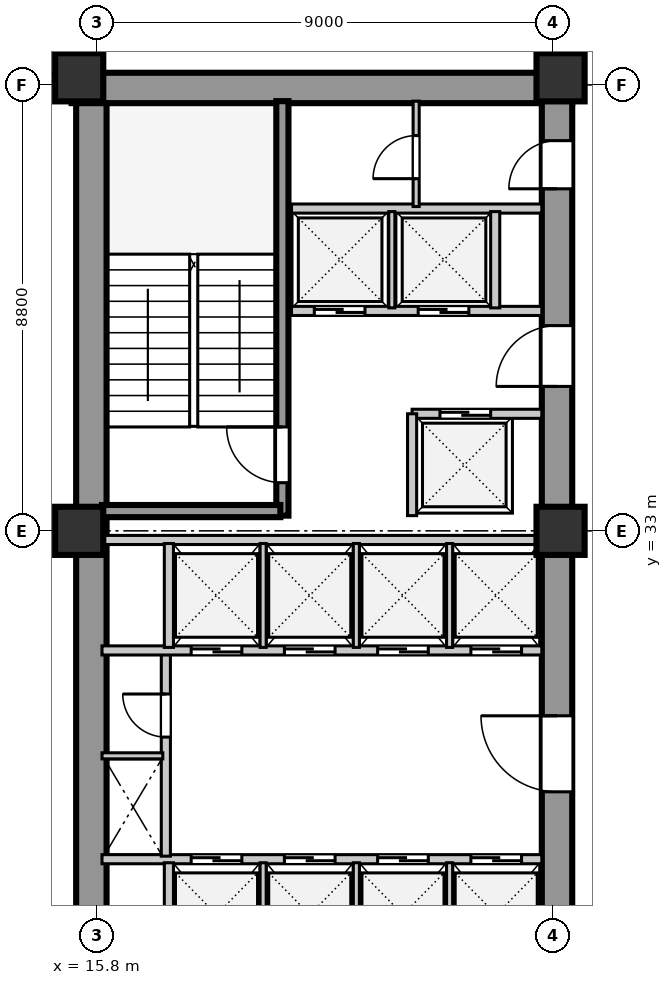
"""IFC4 building model, lengths in metres.
Left out: names, types, materials, properties, quantities, classifications, styles, units other than length and angle.
Written with IfcOpenShell. Run it as: python <this file> out.ifc"""

import sys

from ifc_helpers import new_model, si_unit, direction, frame, frame_2d, origin, origin_2d, place, context, subcontext, project, spatial, rectangle, extrude, element, fill, save


model = new_model("IFC4")
c1 = context("Model", 3, precision=1e-05, world=origin(), true_north=direction((0.0, 1.0)))
c2 = subcontext(c1, "Body", "Model", "MODEL_VIEW")
j1 = project(units=[si_unit("LENGTHUNIT", "METRE"), si_unit("PLANEANGLEUNIT", "RADIAN")], contexts=[c1])
p1 = place(None, origin())
s1 = spatial("IfcSite", under=j1, at=p1, CompositionType="ELEMENT")
p2 = place(p1, origin())
s2 = spatial("IfcBuilding", under=s1, at=p2, CompositionType="ELEMENT")
p3 = place(p2, frame((0.0, 0.0, 8.0)))
s3 = spatial("IfcBuildingStorey", under=s2, at=p3, CompositionType="ELEMENT", Elevation=8.0)
p4 = place(p3, frame((15.3, 41.74, 0.0), z_axis=(0.0, 0.0, 1.0), x_axis=(1.0, 0.0, 0.0)))
e1 = element("IfcWall", 1, at=p4, inside=s3, PredefinedType="SHEAR", context=c2, shape_type="SweptSolid", body=[
    extrude(rectangle(XDim=9.88, YDim=0.6, at=frame_2d((4.94, 0.0))), origin(), (0.0, 0.0, 1.0), 4.22),
])
p5 = place(p3, frame((15.69, 15.81, 0.0), z_axis=(0.0, 0.0, 1.0), x_axis=(0.0, 1.0, 0.0)))
e2 = element("IfcWall", 2, at=p5, inside=s3, PredefinedType="SHEAR", context=c2, shape_type="SweptSolid", body=[
    extrude(rectangle(XDim=25.63, YDim=0.6, at=frame_2d((12.815, 0.0))), origin(), (0.0, 0.0, 1.0), 4.22),
])
p6 = place(p3, frame((24.88, 15.74, 0.0), z_axis=(0.0, 0.0, 1.0), x_axis=(0.0, 1.0, 0.0)))
e3 = element("IfcWall", 3, at=p6, inside=s3, PredefinedType="SHEAR", context=c2, shape_type="SweptSolid", body=[
    extrude(rectangle(XDim=25.76, YDim=0.6, at=frame_2d((12.88, 0.0))), origin(), (0.0, 0.0, 1.0), 4.22),
])
p7 = place(p6, frame((1.61, 0.0, 0.0)))
e4 = element("IfcOpeningElement", 4, at=p7, cuts=e3, PredefinedType="OPENING", context=c2, shape_type="SweptSolid", body=[
    extrude(rectangle(XDim=1.2, YDim=2.1, at=frame_2d((0.6, 1.05))), frame((0.0, 0.31, 0.0), z_axis=(0.0, -1.0, 0.0), x_axis=(1.0, 0.0, 0.0)), (0.0, 0.0, 1.0), 0.62),
])
p8 = place(p6, frame((6.78, 0.0, 0.0)))
e5 = element("IfcOpeningElement", 5, at=p8, cuts=e3, PredefinedType="OPENING", context=c2, shape_type="SweptSolid", body=[
    extrude(rectangle(XDim=0.85, YDim=2.06, at=frame_2d((0.425, 1.03))), frame((0.0, 0.31, 0.0), z_axis=(0.0, -1.0, 0.0), x_axis=(1.0, 0.0, 0.0)), (0.0, 0.0, 1.0), 0.62),
])
p9 = place(p6, frame((12.11, 0.0, 0.0)))
e6 = element("IfcOpeningElement", 6, at=p9, cuts=e3, PredefinedType="OPENING", context=c2, shape_type="SweptSolid", body=[
    extrude(rectangle(XDim=1.5, YDim=2.12, at=frame_2d((0.75, 1.06))), frame((0.0, 0.31, 0.0), z_axis=(0.0, -1.0, 0.0), x_axis=(1.0, 0.0, 0.0)), (0.0, 0.0, 1.0), 0.62),
])
p10 = place(p6, frame((20.11, 0.0, 0.0)))
e7 = element("IfcOpeningElement", 7, at=p10, cuts=e3, PredefinedType="OPENING", context=c2, shape_type="SweptSolid", body=[
    extrude(rectangle(XDim=1.2, YDim=2.12, at=frame_2d((0.6, 1.06))), frame((0.0, 0.31, 0.0), z_axis=(0.0, -1.0, 0.0), x_axis=(1.0, 0.0, 0.0)), (0.0, 0.0, 1.0), 0.62),
])
p11 = place(p6, frame((24.01, 0.0, 0.0)))
e8 = element("IfcOpeningElement", 8, at=p11, cuts=e3, PredefinedType="OPENING", context=c2, shape_type="SweptSolid", body=[
    extrude(rectangle(XDim=0.95, YDim=2.1, at=frame_2d((0.475, 1.05))), frame((0.0, 0.31, 0.0), z_axis=(0.0, -1.0, 0.0), x_axis=(1.0, 0.0, 0.0)), (0.0, 0.0, 1.0), 0.62),
])
for number, where, z_axis, x_axis in (
    (9, (15.45, 33.0, 0.0), (0.0, 0.0, 1.0), (1.0, 0.0, 0.0)),
    (10, (15.45, 41.95, 0.0), (0.0, 0.0, 1.0), (1.0, 0.0, 0.0)),
    (11, (24.95, 33.0, 0.0), (0.0, 0.0, 1.0), (1.0, 0.0, 0.0)),
    (12, (24.95, 41.95, 0.0), (0.0, 0.0, 1.0), (1.0, 0.0, 0.0)),
):
    element("IfcColumn", number, at=place(p3, frame(where, z_axis=z_axis, x_axis=x_axis)), inside=s3, PredefinedType="COLUMN", context=c2, shape_type="SweptSolid", body=[
        extrude(rectangle(XDim=0.95, YDim=0.95, at=origin_2d()), origin(), (0.0, 0.0, 1.0), 4.22),
    ])
p12 = place(p3, frame((15.9, 26.52, 0.0), z_axis=(0.0, 0.0, 1.0), x_axis=(1.0, 0.0, 0.0)))
e13 = element("IfcWall", 13, at=p12, inside=s3, PredefinedType="SOLIDWALL", context=c2, shape_type="SweptSolid", body=[
    extrude(rectangle(XDim=8.68, YDim=0.18, at=frame_2d((4.34, 0.0))), origin(), (0.0, 0.0, 1.0), 4.22),
])
p13 = place(p12, frame((1.76, 0.0, 0.0)))
e14 = element("IfcOpeningElement", 14, at=p13, cuts=e13, PredefinedType="OPENING", context=c2, shape_type="SweptSolid", body=[
    extrude(rectangle(XDim=1.0, YDim=2.1, at=frame_2d((0.5, 1.05))), frame((0.0, 0.1, 0.0), z_axis=(0.0, -1.0, 0.0), x_axis=(1.0, 0.0, 0.0)), (0.0, 0.0, 1.0), 0.2),
])
p14 = place(p12, frame((3.6, 0.0, 0.0)))
e15 = element("IfcOpeningElement", 15, at=p14, cuts=e13, PredefinedType="OPENING", context=c2, shape_type="SweptSolid", body=[
    extrude(rectangle(XDim=1.0, YDim=2.1, at=frame_2d((0.5, 1.05))), frame((0.0, 0.1, 0.0), z_axis=(0.0, -1.0, 0.0), x_axis=(1.0, 0.0, 0.0)), (0.0, 0.0, 1.0), 0.2),
])
p15 = place(p12, frame((5.44, 0.0, 0.0)))
e16 = element("IfcOpeningElement", 16, at=p15, cuts=e13, PredefinedType="OPENING", context=c2, shape_type="SweptSolid", body=[
    extrude(rectangle(XDim=1.0, YDim=2.1, at=frame_2d((0.5, 1.05))), frame((0.0, 0.1, 0.0), z_axis=(0.0, -1.0, 0.0), x_axis=(1.0, 0.0, 0.0)), (0.0, 0.0, 1.0), 0.2),
])
p16 = place(p12, frame((7.28, 0.0, 0.0)))
e17 = element("IfcOpeningElement", 17, at=p16, cuts=e13, PredefinedType="OPENING", context=c2, shape_type="SweptSolid", body=[
    extrude(rectangle(XDim=1.0, YDim=2.1, at=frame_2d((0.5, 1.05))), frame((0.0, 0.1, 0.0), z_axis=(0.0, -1.0, 0.0), x_axis=(1.0, 0.0, 0.0)), (0.0, 0.0, 1.0), 0.2),
])
p17 = place(p3, frame((17.22, 24.4, 0.0), z_axis=(0.0, 0.0, 1.0), x_axis=(0.0, 1.0, 0.0)))
e18 = element("IfcWall", 18, at=p17, inside=s3, PredefinedType="SOLIDWALL", context=c2, shape_type="SweptSolid", body=[
    extrude(rectangle(XDim=2.05, YDim=0.18, at=frame_2d((1.025, 0.0))), origin(), (0.0, 0.0, 1.0), 4.22),
])
for number, where, z_axis, x_axis in (
    (19, (19.08, 24.4, 0.0), (0.0, 0.0, 1.0), (0.0, 1.0, 0.0)),
    (20, (20.92, 24.4, 0.0), (0.0, 0.0, 1.0), (0.0, 1.0, 0.0)),
    (21, (22.76, 24.4, 0.0), (0.0, 0.0, 1.0), (0.0, 1.0, 0.0)),
):
    element("IfcWall", number, at=place(p3, frame(where, z_axis=z_axis, x_axis=x_axis)), inside=s3, PredefinedType="PARTITIONING", context=c2, shape_type="SweptSolid", body=[
        extrude(rectangle(XDim=2.05, YDim=0.12, at=frame_2d((1.025, 0.0))), origin(), (0.0, 0.0, 1.0), 4.22),
    ])
p18 = place(p3, frame((17.16, 26.58, 0.0), z_axis=(0.0, 0.0, 1.0), x_axis=(0.0, 1.0, 0.0)))
e22 = element("IfcWall", 22, at=p18, inside=s3, PredefinedType="SOLIDWALL", context=c2, shape_type="SweptSolid", body=[
    extrude(rectangle(XDim=4.02, YDim=0.18, at=frame_2d((2.01, 0.0))), origin(), (0.0, 0.0, 1.0), 4.22),
])
p19 = place(p18, frame((2.35, 0.0, 0.0)))
e23 = element("IfcOpeningElement", 23, at=p19, cuts=e22, PredefinedType="OPENING", context=c2, shape_type="SweptSolid", body=[
    extrude(rectangle(XDim=0.85, YDim=2.06, at=frame_2d((0.425, 1.03))), frame((0.0, 0.1, 0.0), z_axis=(0.0, -1.0, 0.0), x_axis=(1.0, 0.0, 0.0)), (0.0, 0.0, 1.0), 0.2),
])
p20 = place(p3, frame((15.9, 28.56, 0.0), z_axis=(0.0, 0.0, 1.0), x_axis=(1.0, 0.0, 0.0)))
e24 = element("IfcWall", 24, at=p20, inside=s3, PredefinedType="PARTITIONING", context=c2, shape_type="SweptSolid", body=[
    extrude(rectangle(XDim=1.2, YDim=0.12, at=frame_2d((0.6, 0.0))), origin(), (0.0, 0.0, 1.0), 4.22),
])
p21 = place(p3, frame((15.9, 30.64, 0.0), z_axis=(0.0, 0.0, 1.0), x_axis=(1.0, 0.0, 0.0)))
e25 = element("IfcWall", 25, at=p21, inside=s3, PredefinedType="SOLIDWALL", context=c2, shape_type="SweptSolid", body=[
    extrude(rectangle(XDim=8.68, YDim=0.18, at=frame_2d((4.34, 0.0))), origin(), (0.0, 0.0, 1.0), 4.22),
])
p22 = place(p21, frame((1.76, 0.0, 0.0)))
e26 = element("IfcOpeningElement", 26, at=p22, cuts=e25, PredefinedType="OPENING", context=c2, shape_type="SweptSolid", body=[
    extrude(rectangle(XDim=1.0, YDim=2.1, at=frame_2d((0.5, 1.05))), frame((0.0, 0.1, 0.0), z_axis=(0.0, -1.0, 0.0), x_axis=(1.0, 0.0, 0.0)), (0.0, 0.0, 1.0), 0.2),
])
p23 = place(p21, frame((3.6, 0.0, 0.0)))
e27 = element("IfcOpeningElement", 27, at=p23, cuts=e25, PredefinedType="OPENING", context=c2, shape_type="SweptSolid", body=[
    extrude(rectangle(XDim=1.0, YDim=2.1, at=frame_2d((0.5, 1.05))), frame((0.0, 0.1, 0.0), z_axis=(0.0, -1.0, 0.0), x_axis=(1.0, 0.0, 0.0)), (0.0, 0.0, 1.0), 0.2),
])
p24 = place(p21, frame((5.44, 0.0, 0.0)))
e28 = element("IfcOpeningElement", 28, at=p24, cuts=e25, PredefinedType="OPENING", context=c2, shape_type="SweptSolid", body=[
    extrude(rectangle(XDim=1.0, YDim=2.1, at=frame_2d((0.5, 1.05))), frame((0.0, 0.1, 0.0), z_axis=(0.0, -1.0, 0.0), x_axis=(1.0, 0.0, 0.0)), (0.0, 0.0, 1.0), 0.2),
])
p25 = place(p21, frame((7.28, 0.0, 0.0)))
e29 = element("IfcOpeningElement", 29, at=p25, cuts=e25, PredefinedType="OPENING", context=c2, shape_type="SweptSolid", body=[
    extrude(rectangle(XDim=1.0, YDim=2.1, at=frame_2d((0.5, 1.05))), frame((0.0, 0.1, 0.0), z_axis=(0.0, -1.0, 0.0), x_axis=(1.0, 0.0, 0.0)), (0.0, 0.0, 1.0), 0.2),
])
p26 = place(p3, frame((15.9, 32.82, 0.0), z_axis=(0.0, 0.0, 1.0), x_axis=(1.0, 0.0, 0.0)))
e30 = element("IfcWall", 30, at=p26, inside=s3, PredefinedType="SOLIDWALL", context=c2, shape_type="SweptSolid", body=[
    extrude(rectangle(XDim=8.68, YDim=0.18, at=frame_2d((4.34, 0.0))), origin(), (0.0, 0.0, 1.0), 3.42),
])
p27 = place(p3, frame((17.22, 30.7, 0.0), z_axis=(0.0, 0.0, 1.0), x_axis=(0.0, 1.0, 0.0)))
e31 = element("IfcWall", 31, at=p27, inside=s3, PredefinedType="SOLIDWALL", context=c2, shape_type="SweptSolid", body=[
    extrude(rectangle(XDim=2.05, YDim=0.18, at=frame_2d((1.025, 0.0))), origin(), (0.0, 0.0, 1.0), 4.22),
])
for number, where, z_axis, x_axis in (
    (32, (19.08, 30.7, 0.0), (0.0, 0.0, 1.0), (0.0, 1.0, 0.0)),
    (33, (20.92, 30.7, 0.0), (0.0, 0.0, 1.0), (0.0, 1.0, 0.0)),
    (34, (22.76, 30.7, 0.0), (0.0, 0.0, 1.0), (0.0, 1.0, 0.0)),
):
    element("IfcWall", number, at=place(p3, frame(where, z_axis=z_axis, x_axis=x_axis)), inside=s3, PredefinedType="PARTITIONING", context=c2, shape_type="SweptSolid", body=[
        extrude(rectangle(XDim=2.05, YDim=0.12, at=frame_2d((1.025, 0.0))), origin(), (0.0, 0.0, 1.0), 4.22),
    ])
p28 = place(p3, frame((19.46, 33.3, 0.0), z_axis=(0.0, 0.0, 1.0), x_axis=(0.0, 1.0, 0.0)))
e35 = element("IfcWall", 35, at=p28, inside=s3, PredefinedType="SHEAR", context=c2, shape_type="SweptSolid", body=[
    extrude(rectangle(XDim=8.18, YDim=0.24, at=frame_2d((4.09, 0.0))), origin(), (0.0, 0.0, 1.0), 4.5),
])
p29 = place(p28, frame((0.65, 0.0, 0.0)))
e36 = element("IfcOpeningElement", 36, at=p29, cuts=e35, PredefinedType="OPENING", context=c2, shape_type="SweptSolid", body=[
    extrude(rectangle(XDim=1.1, YDim=2.1, at=frame_2d((0.55, 1.05))), frame((0.0, 0.13, 0.0), z_axis=(0.0, -1.0, 0.0), x_axis=(1.0, 0.0, 0.0)), (0.0, 0.0, 1.0), 0.26),
])
p30 = place(p3, frame((15.9, 33.39, 0.0), z_axis=(0.0, 0.0, 1.0), x_axis=(1.0, 0.0, 0.0)))
e37 = element("IfcWall", 37, at=p30, inside=s3, PredefinedType="SHEAR", context=c2, shape_type="SweptSolid", body=[
    extrude(rectangle(XDim=3.52, YDim=0.24, at=frame_2d((1.76, 0.0))), origin(), (0.0, 0.0, 1.0), 4.5),
])
p31 = place(p3, frame((22.02, 35.31, 0.0), z_axis=(0.0, 0.0, 1.0), x_axis=(1.0, 0.0, 0.0)))
e38 = element("IfcWall", 38, at=p31, inside=s3, PredefinedType="SOLIDWALL", context=c2, shape_type="SweptSolid", body=[
    extrude(rectangle(XDim=2.56, YDim=0.18, at=frame_2d((1.28, 0.0))), origin(), (0.0, 0.0, 1.0), 4.22),
])
p32 = place(p31, frame((0.55, 0.0, 0.0)))
e39 = element("IfcOpeningElement", 39, at=p32, cuts=e38, PredefinedType="OPENING", context=c2, shape_type="SweptSolid", body=[
    extrude(rectangle(XDim=1.0, YDim=2.1, at=frame_2d((0.5, 1.05))), frame((0.0, 0.1, 0.0), z_axis=(0.0, -1.0, 0.0), x_axis=(1.0, 0.0, 0.0)), (0.0, 0.0, 1.0), 0.2),
])
p33 = place(p3, frame((22.02, 33.3, 0.0), z_axis=(0.0, 0.0, 1.0), x_axis=(0.0, 1.0, 0.0)))
e40 = element("IfcWall", 40, at=p33, inside=s3, PredefinedType="SOLIDWALL", context=c2, shape_type="SweptSolid", body=[
    extrude(rectangle(XDim=2.01, YDim=0.18, at=frame_2d((1.005, 0.0))), origin(), (0.0, 0.0, 1.0), 4.22),
])
p34 = place(p3, frame((19.64, 37.34, 0.0), z_axis=(0.0, 0.0, 1.0), x_axis=(1.0, 0.0, 0.0)))
e41 = element("IfcWall", 41, at=p34, inside=s3, PredefinedType="SOLIDWALL", context=c2, shape_type="SweptSolid", body=[
    extrude(rectangle(XDim=4.94, YDim=0.18, at=frame_2d((2.47, 0.0))), origin(), (0.0, 0.0, 1.0), 4.22),
])
p35 = place(p34, frame((0.45, 0.0, 0.0)))
e42 = element("IfcOpeningElement", 42, at=p35, cuts=e41, PredefinedType="OPENING", context=c2, shape_type="SweptSolid", body=[
    extrude(rectangle(XDim=1.0, YDim=2.1, at=frame_2d((0.5, 1.05))), frame((0.0, 0.1, 0.0), z_axis=(0.0, -1.0, 0.0), x_axis=(1.0, 0.0, 0.0)), (0.0, 0.0, 1.0), 0.2),
])
p36 = place(p34, frame((2.5, 0.0, 0.0)))
e43 = element("IfcOpeningElement", 43, at=p36, cuts=e41, PredefinedType="OPENING", context=c2, shape_type="SweptSolid", body=[
    extrude(rectangle(XDim=1.0, YDim=2.1, at=frame_2d((0.5, 1.05))), frame((0.0, 0.1, 0.0), z_axis=(0.0, -1.0, 0.0), x_axis=(1.0, 0.0, 0.0)), (0.0, 0.0, 1.0), 0.2),
])
p37 = place(p3, frame((19.64, 39.36, 0.0), z_axis=(0.0, 0.0, 1.0), x_axis=(1.0, 0.0, 0.0)))
e44 = element("IfcWall", 44, at=p37, inside=s3, PredefinedType="SOLIDWALL", context=c2, shape_type="SweptSolid", body=[
    extrude(rectangle(XDim=4.94, YDim=0.18, at=frame_2d((2.47, 0.0))), origin(), (0.0, 0.0, 1.0), 4.22),
])
p38 = place(p3, frame((21.62, 37.4, 0.0), z_axis=(0.0, 0.0, 1.0), x_axis=(0.0, 1.0, 0.0)))
e45 = element("IfcWall", 45, at=p38, inside=s3, PredefinedType="PARTITIONING", context=c2, shape_type="SweptSolid", body=[
    extrude(rectangle(XDim=1.9, YDim=0.12, at=frame_2d((0.95, 0.0))), origin(), (0.0, 0.0, 1.0), 4.22),
])
p39 = place(p3, frame((23.66, 37.4, 0.0), z_axis=(0.0, 0.0, 1.0), x_axis=(0.0, 1.0, 0.0)))
e46 = element("IfcWall", 46, at=p39, inside=s3, PredefinedType="SOLIDWALL", context=c2, shape_type="SweptSolid", body=[
    extrude(rectangle(XDim=1.9, YDim=0.18, at=frame_2d((0.95, 0.0))), origin(), (0.0, 0.0, 1.0), 4.22),
])
p40 = place(p3, frame((22.1, 39.4, 0.0), z_axis=(0.0, 0.0, 1.0), x_axis=(0.0, 1.0, 0.0)))
e47 = element("IfcWall", 47, at=p40, inside=s3, PredefinedType="PARTITIONING", context=c2, shape_type="SweptSolid", body=[
    extrude(rectangle(XDim=2.08, YDim=0.12, at=frame_2d((1.04, 0.0))), origin(), (0.0, 0.0, 1.0), 4.22),
])
p41 = place(p40, frame((0.55, 0.0, 0.0)))
e48 = element("IfcOpeningElement", 48, at=p41, cuts=e47, PredefinedType="OPENING", context=c2, shape_type="SweptSolid", body=[
    extrude(rectangle(XDim=0.85, YDim=2.06, at=frame_2d((0.425, 1.03))), frame((0.0, 0.07, 0.0), z_axis=(0.0, -1.0, 0.0), x_axis=(1.0, 0.0, 0.0)), (0.0, 0.0, 1.0), 0.14),
])
p42 = place(p3, frame((6.88, 41.95, 0.0), z_axis=(0.0, 0.0, 1.0), x_axis=(1.0, 0.0, 0.0)))
e49 = element("IfcWall", 49, at=p42, inside=s3, PredefinedType="PARTITIONING", context=c2, shape_type="SweptSolid", body=[
    extrude(rectangle(XDim=8.32, YDim=0.15, at=frame_2d((4.16, 0.0))), origin(), (0.0, 0.0, 1.0), 3.72),
])
p43 = place(p13, origin())
e50 = element("IfcDoor", 50, at=p43, inside=s3, OperationType="DOUBLE_DOOR_SLIDING", PredefinedType="DOOR", context=c2, shape_type="SweptSolid", body=[
    extrude(rectangle(XDim=1.0, YDim=2.1, at=frame_2d((0.5, 1.05))), frame((0.0, 0.025, 0.0), z_axis=(0.0, -1.0, 0.0), x_axis=(1.0, 0.0, 0.0)), (0.0, 0.0, 1.0), 0.05),
])
fill(e14, e50)
p44 = place(p14, origin())
e51 = element("IfcDoor", 51, at=p44, inside=s3, OperationType="DOUBLE_DOOR_SLIDING", PredefinedType="DOOR", context=c2, shape_type="SweptSolid", body=[
    extrude(rectangle(XDim=1.0, YDim=2.1, at=frame_2d((0.5, 1.05))), frame((0.0, 0.025, 0.0), z_axis=(0.0, -1.0, 0.0), x_axis=(1.0, 0.0, 0.0)), (0.0, 0.0, 1.0), 0.05),
])
fill(e15, e51)
p45 = place(p15, origin())
e52 = element("IfcDoor", 52, at=p45, inside=s3, OperationType="DOUBLE_DOOR_SLIDING", PredefinedType="DOOR", context=c2, shape_type="SweptSolid", body=[
    extrude(rectangle(XDim=1.0, YDim=2.1, at=frame_2d((0.5, 1.05))), frame((0.0, 0.025, 0.0), z_axis=(0.0, -1.0, 0.0), x_axis=(1.0, 0.0, 0.0)), (0.0, 0.0, 1.0), 0.05),
])
fill(e16, e52)
p46 = place(p16, origin())
e53 = element("IfcDoor", 53, at=p46, inside=s3, OperationType="DOUBLE_DOOR_SLIDING", PredefinedType="DOOR", context=c2, shape_type="SweptSolid", body=[
    extrude(rectangle(XDim=1.0, YDim=2.1, at=frame_2d((0.5, 1.05))), frame((0.0, 0.025, 0.0), z_axis=(0.0, -1.0, 0.0), x_axis=(1.0, 0.0, 0.0)), (0.0, 0.0, 1.0), 0.05),
])
fill(e17, e53)
p47 = place(p19, origin())
e54 = element("IfcDoor", 54, at=p47, inside=s3, OperationType="SINGLE_SWING_RIGHT", PredefinedType="DOOR", context=c2, shape_type="SweptSolid", body=[
    extrude(rectangle(XDim=0.85, YDim=2.06, at=frame_2d((0.425, 1.03))), frame((0.0, 0.025, 0.0), z_axis=(0.0, -1.0, 0.0), x_axis=(1.0, 0.0, 0.0)), (0.0, 0.0, 1.0), 0.05),
])
fill(e23, e54)
p48 = place(p9, frame((1.5, 0.0, 0.0), z_axis=(0.0, 0.0, 1.0), x_axis=(-1.0, 0.0, 0.0)))
e55 = element("IfcDoor", 55, at=p48, inside=s3, OperationType="SINGLE_SWING_LEFT", PredefinedType="DOOR", context=c2, shape_type="SweptSolid", body=[
    extrude(rectangle(XDim=1.5, YDim=2.12, at=frame_2d((0.75, 1.06))), frame((0.0, 0.025, 0.0), z_axis=(0.0, -1.0, 0.0), x_axis=(1.0, 0.0, 0.0)), (0.0, 0.0, 1.0), 0.05),
])
fill(e6, e55)
p49 = place(p22, frame((1.0, 0.0, 0.0), z_axis=(0.0, 0.0, 1.0), x_axis=(-1.0, 0.0, 0.0)))
e56 = element("IfcDoor", 56, at=p49, inside=s3, OperationType="DOUBLE_DOOR_SLIDING", PredefinedType="DOOR", context=c2, shape_type="SweptSolid", body=[
    extrude(rectangle(XDim=1.0, YDim=2.1, at=frame_2d((0.5, 1.05))), frame((0.0, 0.025, 0.0), z_axis=(0.0, -1.0, 0.0), x_axis=(1.0, 0.0, 0.0)), (0.0, 0.0, 1.0), 0.05),
])
fill(e26, e56)
p50 = place(p23, frame((1.0, 0.0, 0.0), z_axis=(0.0, 0.0, 1.0), x_axis=(-1.0, 0.0, 0.0)))
e57 = element("IfcDoor", 57, at=p50, inside=s3, OperationType="DOUBLE_DOOR_SLIDING", PredefinedType="DOOR", context=c2, shape_type="SweptSolid", body=[
    extrude(rectangle(XDim=1.0, YDim=2.1, at=frame_2d((0.5, 1.05))), frame((0.0, 0.025, 0.0), z_axis=(0.0, -1.0, 0.0), x_axis=(1.0, 0.0, 0.0)), (0.0, 0.0, 1.0), 0.05),
])
fill(e27, e57)
p51 = place(p24, frame((1.0, 0.0, 0.0), z_axis=(0.0, 0.0, 1.0), x_axis=(-1.0, 0.0, 0.0)))
e58 = element("IfcDoor", 58, at=p51, inside=s3, OperationType="DOUBLE_DOOR_SLIDING", PredefinedType="DOOR", context=c2, shape_type="SweptSolid", body=[
    extrude(rectangle(XDim=1.0, YDim=2.1, at=frame_2d((0.5, 1.05))), frame((0.0, 0.025, 0.0), z_axis=(0.0, -1.0, 0.0), x_axis=(1.0, 0.0, 0.0)), (0.0, 0.0, 1.0), 0.05),
])
fill(e28, e58)
p52 = place(p25, frame((1.0, 0.0, 0.0), z_axis=(0.0, 0.0, 1.0), x_axis=(-1.0, 0.0, 0.0)))
e59 = element("IfcDoor", 59, at=p52, inside=s3, OperationType="DOUBLE_DOOR_SLIDING", PredefinedType="DOOR", context=c2, shape_type="SweptSolid", body=[
    extrude(rectangle(XDim=1.0, YDim=2.1, at=frame_2d((0.5, 1.05))), frame((0.0, 0.025, 0.0), z_axis=(0.0, -1.0, 0.0), x_axis=(1.0, 0.0, 0.0)), (0.0, 0.0, 1.0), 0.05),
])
fill(e29, e59)
p53 = place(p29, origin())
e60 = element("IfcDoor", 60, at=p53, inside=s3, OperationType="SINGLE_SWING_RIGHT", PredefinedType="DOOR", context=c2, shape_type="SweptSolid", body=[
    extrude(rectangle(XDim=1.1, YDim=2.1, at=frame_2d((0.55, 1.05))), frame((0.0, 0.025, 0.0), z_axis=(0.0, -1.0, 0.0), x_axis=(1.0, 0.0, 0.0)), (0.0, 0.0, 1.0), 0.05),
])
fill(e36, e60)
p54 = place(p10, frame((1.2, 0.0, 0.0), z_axis=(0.0, 0.0, 1.0), x_axis=(-1.0, 0.0, 0.0)))
e61 = element("IfcDoor", 61, at=p54, inside=s3, OperationType="SINGLE_SWING_RIGHT", PredefinedType="DOOR", context=c2, shape_type="SweptSolid", body=[
    extrude(rectangle(XDim=1.2, YDim=2.12, at=frame_2d((0.6, 1.06))), frame((0.0, 0.025, 0.0), z_axis=(0.0, -1.0, 0.0), x_axis=(1.0, 0.0, 0.0)), (0.0, 0.0, 1.0), 0.05),
])
fill(e7, e61)
p55 = place(p35, frame((1.0, 0.0, 0.0), z_axis=(0.0, 0.0, 1.0), x_axis=(-1.0, 0.0, 0.0)))
e62 = element("IfcDoor", 62, at=p55, inside=s3, OperationType="DOUBLE_DOOR_SLIDING", PredefinedType="DOOR", context=c2, shape_type="SweptSolid", body=[
    extrude(rectangle(XDim=1.0, YDim=2.1, at=frame_2d((0.5, 1.05))), frame((0.0, 0.025, 0.0), z_axis=(0.0, -1.0, 0.0), x_axis=(1.0, 0.0, 0.0)), (0.0, 0.0, 1.0), 0.05),
])
fill(e42, e62)
p56 = place(p36, frame((1.0, 0.0, 0.0), z_axis=(0.0, 0.0, 1.0), x_axis=(-1.0, 0.0, 0.0)))
e63 = element("IfcDoor", 63, at=p56, inside=s3, OperationType="DOUBLE_DOOR_SLIDING", PredefinedType="DOOR", context=c2, shape_type="SweptSolid", body=[
    extrude(rectangle(XDim=1.0, YDim=2.1, at=frame_2d((0.5, 1.05))), frame((0.0, 0.025, 0.0), z_axis=(0.0, -1.0, 0.0), x_axis=(1.0, 0.0, 0.0)), (0.0, 0.0, 1.0), 0.05),
])
fill(e43, e63)
p57 = place(p32, origin())
e64 = element("IfcDoor", 64, at=p57, inside=s3, OperationType="DOUBLE_DOOR_SLIDING", PredefinedType="DOOR", context=c2, shape_type="SweptSolid", body=[
    extrude(rectangle(XDim=1.0, YDim=2.1, at=frame_2d((0.5, 1.05))), frame((0.0, 0.025, 0.0), z_axis=(0.0, -1.0, 0.0), x_axis=(1.0, 0.0, 0.0)), (0.0, 0.0, 1.0), 0.05),
])
fill(e39, e64)
p58 = place(p41, origin())
e65 = element("IfcDoor", 65, at=p58, inside=s3, OperationType="SINGLE_SWING_LEFT", PredefinedType="DOOR", context=c2, shape_type="SweptSolid", body=[
    extrude(rectangle(XDim=0.85, YDim=2.06, at=frame_2d((0.425, 1.03))), frame((0.0, 0.025, 0.0), z_axis=(0.0, -1.0, 0.0), x_axis=(1.0, 0.0, 0.0)), (0.0, 0.0, 1.0), 0.05),
])
fill(e48, e65)
p59 = place(p11, frame((0.95, 0.0, 0.0), z_axis=(0.0, 0.0, 1.0), x_axis=(-1.0, 0.0, 0.0)))
e66 = element("IfcDoor", 66, at=p59, inside=s3, OperationType="SINGLE_SWING_RIGHT", PredefinedType="DOOR", context=c2, shape_type="SweptSolid", body=[
    extrude(rectangle(XDim=0.95, YDim=2.1, at=frame_2d((0.475, 1.05))), frame((0.0, 0.025, 0.0), z_axis=(0.0, -1.0, 0.0), x_axis=(1.0, 0.0, 0.0)), (0.0, 0.0, 1.0), 0.05),
])
fill(e8, e66)
save(model, sys.argv[1])
